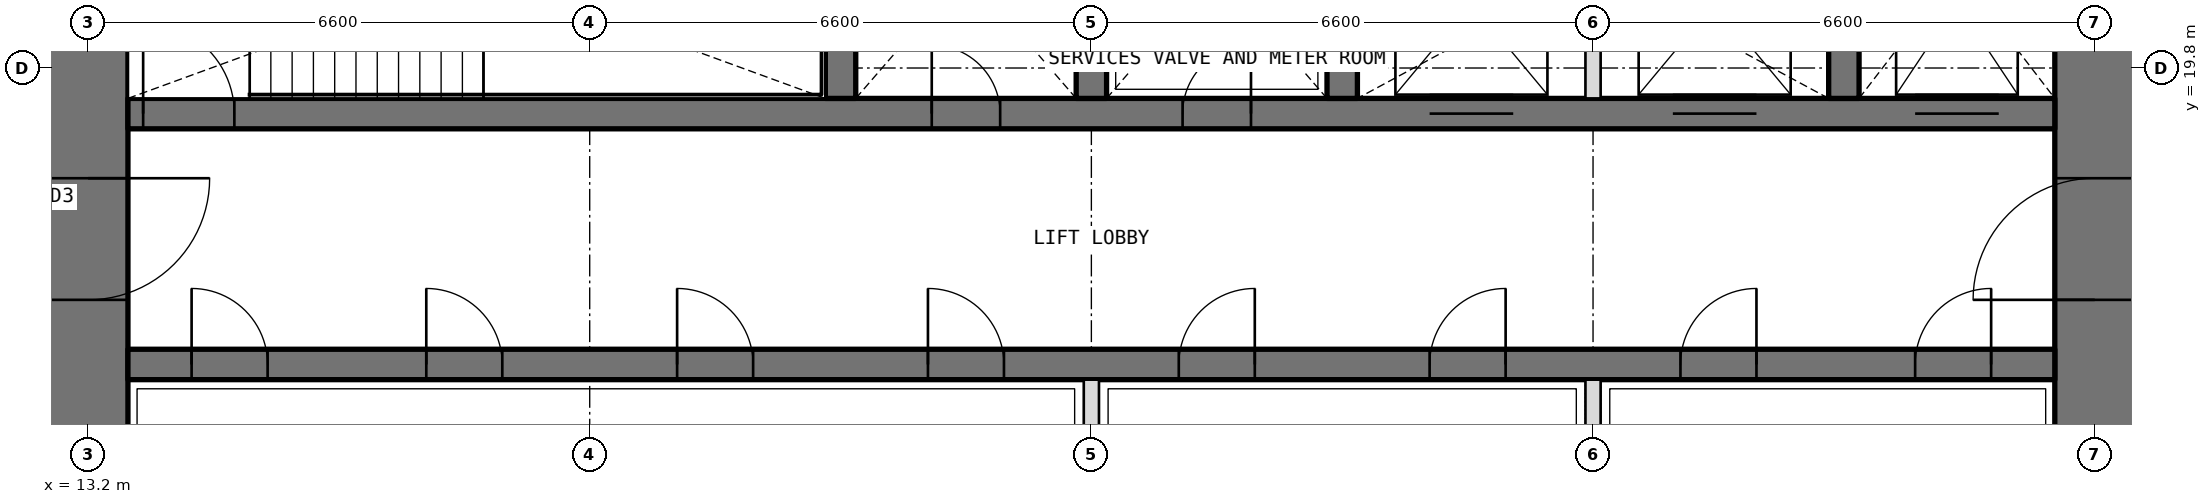
"""IFC4 building model, lengths in metres.
Left out: names, types, materials, properties, quantities, classifications, styles, units other than length and angle.
Written with IfcOpenShell. Run it as: python <this file> out.ifc"""

import sys

from ifc_helpers import new_model, si_unit, direction, frame, frame_2d, origin, place, context, subcontext, project, spatial, rectangle, extrude, element, fill, save


model = new_model("IFC4")
c1 = context("Model", 3, precision=1e-05, world=origin(), true_north=direction((0.0, 1.0)))
c2 = subcontext(c1, "Body", "Model", "MODEL_VIEW")
j1 = project(units=[si_unit("LENGTHUNIT", "METRE"), si_unit("PLANEANGLEUNIT", "RADIAN")], contexts=[c1])
p1 = place(None, origin())
s1 = spatial("IfcSite", under=j1, at=p1, CompositionType="ELEMENT")
p2 = place(p1, origin())
s2 = spatial("IfcBuilding", under=s1, at=p2, CompositionType="ELEMENT")
p3 = place(p2, frame((0.0, 0.0, 185.1)))
s3 = spatial("IfcBuildingStorey", under=s2, at=p3, CompositionType="ELEMENT", Elevation=185.1)
p4 = place(p3, frame((39.6, 13.725, 0.0), z_axis=(0.0, 0.0, 1.0), x_axis=(0.0, 1.0, 0.0)))
e1 = element("IfcWall", 1, at=p4, inside=s3, PredefinedType="SHEAR", context=c2, shape_type="SweptSolid", body=[
    extrude(rectangle(XDim=18.75, YDim=1.05, at=frame_2d((9.375, 0.0))), origin(), (0.0, 0.0, 1.0), 4.2),
])
p5 = place(p4, frame((3.025, 0.0, 0.0)))
e2 = element("IfcOpeningElement", 2, at=p5, cuts=e1, PredefinedType="OPENING", context=c2, shape_type="SweptSolid", body=[
    extrude(rectangle(XDim=1.6, YDim=2.1, at=frame_2d((0.8, 1.05))), frame((0.0, 0.535, 0.0), z_axis=(0.0, -1.0, 0.0), x_axis=(1.0, 0.0, 0.0)), (0.0, 0.0, 1.0), 1.07),
])
p6 = place(p4, frame((13.825, 0.0, 0.0)))
e3 = element("IfcOpeningElement", 3, at=p6, cuts=e1, PredefinedType="OPENING", context=c2, shape_type="SweptSolid", body=[
    extrude(rectangle(XDim=1.6, YDim=2.1, at=frame_2d((0.8, 1.05))), frame((0.0, 0.535, 0.0), z_axis=(0.0, -1.0, 0.0), x_axis=(1.0, 0.0, 0.0)), (0.0, 0.0, 1.0), 1.07),
])
p7 = place(p3, frame((13.2, 32.475, 0.0), z_axis=(0.0, 0.0, 1.0), x_axis=(0.0, -1.0, 0.0)))
e4 = element("IfcWall", 4, at=p7, inside=s3, PredefinedType="SHEAR", context=c2, shape_type="SweptSolid", body=[
    extrude(rectangle(XDim=18.75, YDim=1.05, at=frame_2d((9.375, 0.0))), origin(), (0.0, 0.0, 1.0), 4.2),
])
p8 = place(p7, frame((14.125, 0.0, 0.0)))
e5 = element("IfcOpeningElement", 5, at=p8, cuts=e4, PredefinedType="OPENING", context=c2, shape_type="SweptSolid", body=[
    extrude(rectangle(XDim=1.6, YDim=2.1, at=frame_2d((0.8, 1.05))), frame((0.0, 0.535, 0.0), z_axis=(0.0, -1.0, 0.0), x_axis=(1.0, 0.0, 0.0)), (0.0, 0.0, 1.0), 1.07),
])
p9 = place(p7, frame((3.325, 0.0, 0.0)))
e6 = element("IfcOpeningElement", 6, at=p9, cuts=e4, PredefinedType="OPENING", context=c2, shape_type="SweptSolid", body=[
    extrude(rectangle(XDim=1.6, YDim=2.1, at=frame_2d((0.8, 1.05))), frame((0.0, 0.535, 0.0), z_axis=(0.0, -1.0, 0.0), x_axis=(1.0, 0.0, 0.0)), (0.0, 0.0, 1.0), 1.07),
])
p10 = place(p3, frame((13.725, 15.9, 0.0), z_axis=(0.0, 0.0, 1.0), x_axis=(1.0, 0.0, 0.0)))
e7 = element("IfcWall", 7, at=p10, inside=s3, PredefinedType="SHEAR", context=c2, shape_type="SweptSolid", body=[
    extrude(rectangle(XDim=25.35, YDim=0.4, at=frame_2d((12.675, 0.0))), origin(), (0.0, 0.0, 1.0), 4.2),
])
p11 = place(p10, frame((0.837, 0.0, 0.0)))
e8 = element("IfcOpeningElement", 8, at=p11, cuts=e7, PredefinedType="OPENING", context=c2, shape_type="SweptSolid", body=[
    extrude(rectangle(XDim=1.0, YDim=2.1, at=frame_2d((0.5, 1.05))), frame((0.0, 0.21, 0.0), z_axis=(0.0, -1.0, 0.0), x_axis=(1.0, 0.0, 0.0)), (0.0, 0.0, 1.0), 0.42),
])
p12 = place(p10, frame((3.925, 0.0, 0.0)))
e9 = element("IfcOpeningElement", 9, at=p12, cuts=e7, PredefinedType="OPENING", context=c2, shape_type="SweptSolid", body=[
    extrude(rectangle(XDim=1.0, YDim=2.1, at=frame_2d((0.5, 1.05))), frame((0.0, 0.21, 0.0), z_axis=(0.0, -1.0, 0.0), x_axis=(1.0, 0.0, 0.0)), (0.0, 0.0, 1.0), 0.42),
])
p13 = place(p10, frame((7.225, 0.0, 0.0)))
e10 = element("IfcOpeningElement", 10, at=p13, cuts=e7, PredefinedType="OPENING", context=c2, shape_type="SweptSolid", body=[
    extrude(rectangle(XDim=1.0, YDim=2.1, at=frame_2d((0.5, 1.05))), frame((0.0, 0.21, 0.0), z_axis=(0.0, -1.0, 0.0), x_axis=(1.0, 0.0, 0.0)), (0.0, 0.0, 1.0), 0.42),
])
p14 = place(p10, frame((10.525, 0.0, 0.0)))
e11 = element("IfcOpeningElement", 11, at=p14, cuts=e7, PredefinedType="OPENING", context=c2, shape_type="SweptSolid", body=[
    extrude(rectangle(XDim=1.0, YDim=2.1, at=frame_2d((0.5, 1.05))), frame((0.0, 0.21, 0.0), z_axis=(0.0, -1.0, 0.0), x_axis=(1.0, 0.0, 0.0)), (0.0, 0.0, 1.0), 0.42),
])
p15 = place(p10, frame((13.825, 0.0, 0.0)))
e12 = element("IfcOpeningElement", 12, at=p15, cuts=e7, PredefinedType="OPENING", context=c2, shape_type="SweptSolid", body=[
    extrude(rectangle(XDim=1.0, YDim=2.1, at=frame_2d((0.5, 1.05))), frame((0.0, 0.21, 0.0), z_axis=(0.0, -1.0, 0.0), x_axis=(1.0, 0.0, 0.0)), (0.0, 0.0, 1.0), 0.42),
])
p16 = place(p10, frame((17.125, 0.0, 0.0)))
e13 = element("IfcOpeningElement", 13, at=p16, cuts=e7, PredefinedType="OPENING", context=c2, shape_type="SweptSolid", body=[
    extrude(rectangle(XDim=1.0, YDim=2.1, at=frame_2d((0.5, 1.05))), frame((0.0, 0.21, 0.0), z_axis=(0.0, -1.0, 0.0), x_axis=(1.0, 0.0, 0.0)), (0.0, 0.0, 1.0), 0.42),
])
p17 = place(p10, frame((20.425, 0.0, 0.0)))
e14 = element("IfcOpeningElement", 14, at=p17, cuts=e7, PredefinedType="OPENING", context=c2, shape_type="SweptSolid", body=[
    extrude(rectangle(XDim=1.0, YDim=2.1, at=frame_2d((0.5, 1.05))), frame((0.0, 0.21, 0.0), z_axis=(0.0, -1.0, 0.0), x_axis=(1.0, 0.0, 0.0)), (0.0, 0.0, 1.0), 0.42),
])
p18 = place(p10, frame((23.512, 0.0, 0.0)))
e15 = element("IfcOpeningElement", 15, at=p18, cuts=e7, PredefinedType="OPENING", context=c2, shape_type="SweptSolid", body=[
    extrude(rectangle(XDim=1.0, YDim=2.1, at=frame_2d((0.5, 1.05))), frame((0.0, 0.21, 0.0), z_axis=(0.0, -1.0, 0.0), x_axis=(1.0, 0.0, 0.0)), (0.0, 0.0, 1.0), 0.42),
])
p19 = place(p3, frame((13.725, 19.2, 0.0), z_axis=(0.0, 0.0, 1.0), x_axis=(1.0, 0.0, 0.0)))
e16 = element("IfcWall", 16, at=p19, inside=s3, PredefinedType="SHEAR", context=c2, shape_type="SweptSolid", body=[
    extrude(rectangle(XDim=25.35, YDim=0.4, at=frame_2d((12.675, 0.0))), origin(), (0.0, 0.0, 1.0), 4.2),
])
p20 = place(p19, frame((10.575, 0.0, 0.0)))
e17 = element("IfcOpeningElement", 17, at=p20, cuts=e16, PredefinedType="OPENING", context=c2, shape_type="SweptSolid", body=[
    extrude(rectangle(XDim=0.9, YDim=2.1, at=frame_2d((0.45, 1.05))), frame((0.0, 0.21, 0.0), z_axis=(0.0, -1.0, 0.0), x_axis=(1.0, 0.0, 0.0)), (0.0, 0.0, 1.0), 0.42),
])
p21 = place(p19, frame((13.875, 0.0, 0.0)))
e18 = element("IfcOpeningElement", 18, at=p21, cuts=e16, PredefinedType="OPENING", context=c2, shape_type="SweptSolid", body=[
    extrude(rectangle(XDim=0.9, YDim=2.1, at=frame_2d((0.45, 1.05))), frame((0.0, 0.21, 0.0), z_axis=(0.0, -1.0, 0.0), x_axis=(1.0, 0.0, 0.0)), (0.0, 0.0, 1.0), 0.42),
])
p22 = place(p19, frame((0.2, 0.0, 0.0)))
e19 = element("IfcOpeningElement", 19, at=p22, cuts=e16, PredefinedType="OPENING", context=c2, shape_type="SweptSolid", body=[
    extrude(rectangle(XDim=1.2, YDim=2.1, at=frame_2d((0.6, 1.05))), frame((0.0, 0.21, 0.0), z_axis=(0.0, -1.0, 0.0), x_axis=(1.0, 0.0, 0.0)), (0.0, 0.0, 1.0), 0.42),
])
p23 = place(p19, frame((23.512, 0.0, 0.0)))
e20 = element("IfcOpeningElement", 20, at=p23, cuts=e16, PredefinedType="OPENING", context=c2, shape_type="SweptSolid", body=[
    extrude(rectangle(XDim=1.1, YDim=2.1, at=frame_2d((0.55, 1.05))), frame((0.0, 0.21, 0.0), z_axis=(0.0, -1.0, 0.0), x_axis=(1.0, 0.0, 0.0)), (0.0, 0.0, 1.0), 0.42),
])
p24 = place(p19, frame((17.125, 0.0, 0.0)))
e21 = element("IfcOpeningElement", 21, at=p24, cuts=e16, PredefinedType="OPENING", context=c2, shape_type="SweptSolid", body=[
    extrude(rectangle(XDim=1.1, YDim=2.1, at=frame_2d((0.55, 1.05))), frame((0.0, 0.21, 0.0), z_axis=(0.0, -1.0, 0.0), x_axis=(1.0, 0.0, 0.0)), (0.0, 0.0, 1.0), 0.42),
])
p25 = place(p19, frame((20.325, 0.0, 0.0)))
e22 = element("IfcOpeningElement", 22, at=p25, cuts=e16, PredefinedType="OPENING", context=c2, shape_type="SweptSolid", body=[
    extrude(rectangle(XDim=1.1, YDim=2.1, at=frame_2d((0.55, 1.05))), frame((0.0, 0.21, 0.0), z_axis=(0.0, -1.0, 0.0), x_axis=(1.0, 0.0, 0.0)), (0.0, 0.0, 1.0), 0.42),
])
for number, where, z_axis, x_axis in (
    (23, (23.1, 19.4, 0.0), (0.0, 0.0, 1.0), (0.0, 1.0, 0.0)),
    (24, (26.4, 19.4, 0.0), (0.0, 0.0, 1.0), (0.0, 1.0, 0.0)),
    (25, (29.7, 19.4, 0.0), (0.0, 0.0, 1.0), (0.0, 1.0, 0.0)),
    (26, (36.3, 19.4, 0.0), (0.0, 0.0, 1.0), (0.0, 1.0, 0.0)),
):
    element("IfcWall", number, at=place(p3, frame(where, z_axis=z_axis, x_axis=x_axis)), inside=s3, PredefinedType="SHEAR", context=c2, shape_type="SweptSolid", body=[
        extrude(rectangle(XDim=3.35, YDim=0.4, at=frame_2d((1.675, 0.0))), origin(), (0.0, 0.0, 1.0), 4.2),
    ])
for number, where, z_axis, x_axis in (
    (27, (26.4, 13.725, 0.0), (0.0, 0.0, 1.0), (0.0, 1.0, 0.0)),
    (28, (33.0, 13.725, 0.0), (0.0, 0.0, 1.0), (0.0, 1.0, 0.0)),
):
    element("IfcWall", number, at=place(p3, frame(where, z_axis=z_axis, x_axis=x_axis)), inside=s3, PredefinedType="PARTITIONING", context=c2, shape_type="SweptSolid", body=[
        extrude(rectangle(XDim=1.975, YDim=0.2, at=frame_2d((0.987, 0.0))), origin(), (0.0, 0.0, 1.0), 4.2),
    ])
p26 = place(p3, frame((33.0, 19.4, 0.0), z_axis=(0.0, 0.0, 1.0), x_axis=(0.0, 1.0, 0.0)))
e29 = element("IfcWall", 29, at=p26, inside=s3, PredefinedType="PARTITIONING", context=c2, shape_type="SweptSolid", body=[
    extrude(rectangle(XDim=3.35, YDim=0.2, at=frame_2d((1.675, 0.0))), origin(), (0.0, 0.0, 1.0), 4.2),
])
p27 = place(p20, origin())
e30 = element("IfcDoor", 30, at=p27, inside=s3, OperationType="SINGLE_SWING_LEFT", PredefinedType="DOOR", context=c2, shape_type="SweptSolid", body=[
    extrude(rectangle(XDim=0.9, YDim=2.1, at=frame_2d((0.45, 1.05))), frame((0.0, 0.025, 0.0), z_axis=(0.0, -1.0, 0.0), x_axis=(1.0, 0.0, 0.0)), (0.0, 0.0, 1.0), 0.05),
])
fill(e17, e30)
p28 = place(p21, origin())
e31 = element("IfcDoor", 31, at=p28, inside=s3, OperationType="SINGLE_SWING_RIGHT", PredefinedType="DOOR", context=c2, shape_type="SweptSolid", body=[
    extrude(rectangle(XDim=0.9, YDim=2.1, at=frame_2d((0.45, 1.05))), frame((0.0, 0.025, 0.0), z_axis=(0.0, -1.0, 0.0), x_axis=(1.0, 0.0, 0.0)), (0.0, 0.0, 1.0), 0.05),
])
fill(e18, e31)
p29 = place(p11, origin())
e32 = element("IfcDoor", 32, at=p29, inside=s3, OperationType="SINGLE_SWING_LEFT", PredefinedType="DOOR", context=c2, shape_type="SweptSolid", body=[
    extrude(rectangle(XDim=1.0, YDim=2.1, at=frame_2d((0.5, 1.05))), frame((0.0, 0.025, 0.0), z_axis=(0.0, -1.0, 0.0), x_axis=(1.0, 0.0, 0.0)), (0.0, 0.0, 1.0), 0.05),
])
fill(e8, e32)
p30 = place(p12, origin())
e33 = element("IfcDoor", 33, at=p30, inside=s3, OperationType="SINGLE_SWING_LEFT", PredefinedType="DOOR", context=c2, shape_type="SweptSolid", body=[
    extrude(rectangle(XDim=1.0, YDim=2.1, at=frame_2d((0.5, 1.05))), frame((0.0, 0.025, 0.0), z_axis=(0.0, -1.0, 0.0), x_axis=(1.0, 0.0, 0.0)), (0.0, 0.0, 1.0), 0.05),
])
fill(e9, e33)
p31 = place(p13, origin())
e34 = element("IfcDoor", 34, at=p31, inside=s3, OperationType="SINGLE_SWING_LEFT", PredefinedType="DOOR", context=c2, shape_type="SweptSolid", body=[
    extrude(rectangle(XDim=1.0, YDim=2.1, at=frame_2d((0.5, 1.05))), frame((0.0, 0.025, 0.0), z_axis=(0.0, -1.0, 0.0), x_axis=(1.0, 0.0, 0.0)), (0.0, 0.0, 1.0), 0.05),
])
fill(e10, e34)
p32 = place(p14, origin())
e35 = element("IfcDoor", 35, at=p32, inside=s3, OperationType="SINGLE_SWING_LEFT", PredefinedType="DOOR", context=c2, shape_type="SweptSolid", body=[
    extrude(rectangle(XDim=1.0, YDim=2.1, at=frame_2d((0.5, 1.05))), frame((0.0, 0.025, 0.0), z_axis=(0.0, -1.0, 0.0), x_axis=(1.0, 0.0, 0.0)), (0.0, 0.0, 1.0), 0.05),
])
fill(e11, e35)
p33 = place(p15, origin())
e36 = element("IfcDoor", 36, at=p33, inside=s3, OperationType="SINGLE_SWING_RIGHT", PredefinedType="DOOR", context=c2, shape_type="SweptSolid", body=[
    extrude(rectangle(XDim=1.0, YDim=2.1, at=frame_2d((0.5, 1.05))), frame((0.0, 0.025, 0.0), z_axis=(0.0, -1.0, 0.0), x_axis=(1.0, 0.0, 0.0)), (0.0, 0.0, 1.0), 0.05),
])
fill(e12, e36)
p34 = place(p16, origin())
e37 = element("IfcDoor", 37, at=p34, inside=s3, OperationType="SINGLE_SWING_RIGHT", PredefinedType="DOOR", context=c2, shape_type="SweptSolid", body=[
    extrude(rectangle(XDim=1.0, YDim=2.1, at=frame_2d((0.5, 1.05))), frame((0.0, 0.025, 0.0), z_axis=(0.0, -1.0, 0.0), x_axis=(1.0, 0.0, 0.0)), (0.0, 0.0, 1.0), 0.05),
])
fill(e13, e37)
p35 = place(p17, origin())
e38 = element("IfcDoor", 38, at=p35, inside=s3, OperationType="SINGLE_SWING_RIGHT", PredefinedType="DOOR", context=c2, shape_type="SweptSolid", body=[
    extrude(rectangle(XDim=1.0, YDim=2.1, at=frame_2d((0.5, 1.05))), frame((0.0, 0.025, 0.0), z_axis=(0.0, -1.0, 0.0), x_axis=(1.0, 0.0, 0.0)), (0.0, 0.0, 1.0), 0.05),
])
fill(e14, e38)
p36 = place(p18, origin())
e39 = element("IfcDoor", 39, at=p36, inside=s3, OperationType="SINGLE_SWING_RIGHT", PredefinedType="DOOR", context=c2, shape_type="SweptSolid", body=[
    extrude(rectangle(XDim=1.0, YDim=2.1, at=frame_2d((0.5, 1.05))), frame((0.0, 0.025, 0.0), z_axis=(0.0, -1.0, 0.0), x_axis=(1.0, 0.0, 0.0)), (0.0, 0.0, 1.0), 0.05),
])
fill(e15, e39)
p37 = place(p22, origin())
e40 = element("IfcDoor", 40, at=p37, inside=s3, OperationType="SINGLE_SWING_LEFT", PredefinedType="DOOR", context=c2, shape_type="SweptSolid", body=[
    extrude(rectangle(XDim=1.2, YDim=2.1, at=frame_2d((0.6, 1.05))), frame((0.0, 0.025, 0.0), z_axis=(0.0, -1.0, 0.0), x_axis=(1.0, 0.0, 0.0)), (0.0, 0.0, 1.0), 0.05),
])
fill(e19, e40)
p38 = place(p8, origin())
e41 = element("IfcDoor", 41, at=p38, inside=s3, OperationType="DOUBLE_DOOR_DOUBLE_SWING", PredefinedType="DOOR", context=c2, shape_type="SweptSolid", body=[
    extrude(rectangle(XDim=1.6, YDim=2.1, at=frame_2d((0.8, 1.05))), frame((0.0, 0.025, 0.0), z_axis=(0.0, -1.0, 0.0), x_axis=(1.0, 0.0, 0.0)), (0.0, 0.0, 1.0), 0.05),
])
fill(e5, e41)
p39 = place(p5, origin())
e42 = element("IfcDoor", 42, at=p39, inside=s3, OperationType="DOUBLE_DOOR_DOUBLE_SWING", PredefinedType="DOOR", context=c2, shape_type="SweptSolid", body=[
    extrude(rectangle(XDim=1.6, YDim=2.1, at=frame_2d((0.8, 1.05))), frame((0.0, 0.025, 0.0), z_axis=(0.0, -1.0, 0.0), x_axis=(1.0, 0.0, 0.0)), (0.0, 0.0, 1.0), 0.05),
])
fill(e2, e42)
p40 = place(p23, origin())
e43 = element("IfcDoor", 43, at=p40, inside=s3, OperationType="DOUBLE_DOOR_SLIDING", PredefinedType="DOOR", context=c2, shape_type="SweptSolid", body=[
    extrude(rectangle(XDim=1.1, YDim=2.1, at=frame_2d((0.55, 1.05))), frame((0.0, 0.025, 0.0), z_axis=(0.0, -1.0, 0.0), x_axis=(1.0, 0.0, 0.0)), (0.0, 0.0, 1.0), 0.05),
])
fill(e20, e43)
p41 = place(p24, origin())
e44 = element("IfcDoor", 44, at=p41, inside=s3, OperationType="DOUBLE_DOOR_SLIDING", PredefinedType="DOOR", context=c2, shape_type="SweptSolid", body=[
    extrude(rectangle(XDim=1.1, YDim=2.1, at=frame_2d((0.55, 1.05))), frame((0.0, 0.025, 0.0), z_axis=(0.0, -1.0, 0.0), x_axis=(1.0, 0.0, 0.0)), (0.0, 0.0, 1.0), 0.05),
])
fill(e21, e44)
p42 = place(p25, origin())
e45 = element("IfcDoor", 45, at=p42, inside=s3, OperationType="DOUBLE_DOOR_SLIDING", PredefinedType="DOOR", context=c2, shape_type="SweptSolid", body=[
    extrude(rectangle(XDim=1.1, YDim=2.1, at=frame_2d((0.55, 1.05))), frame((0.0, 0.025, 0.0), z_axis=(0.0, -1.0, 0.0), x_axis=(1.0, 0.0, 0.0)), (0.0, 0.0, 1.0), 0.05),
])
fill(e22, e45)
save(model, sys.argv[1])
